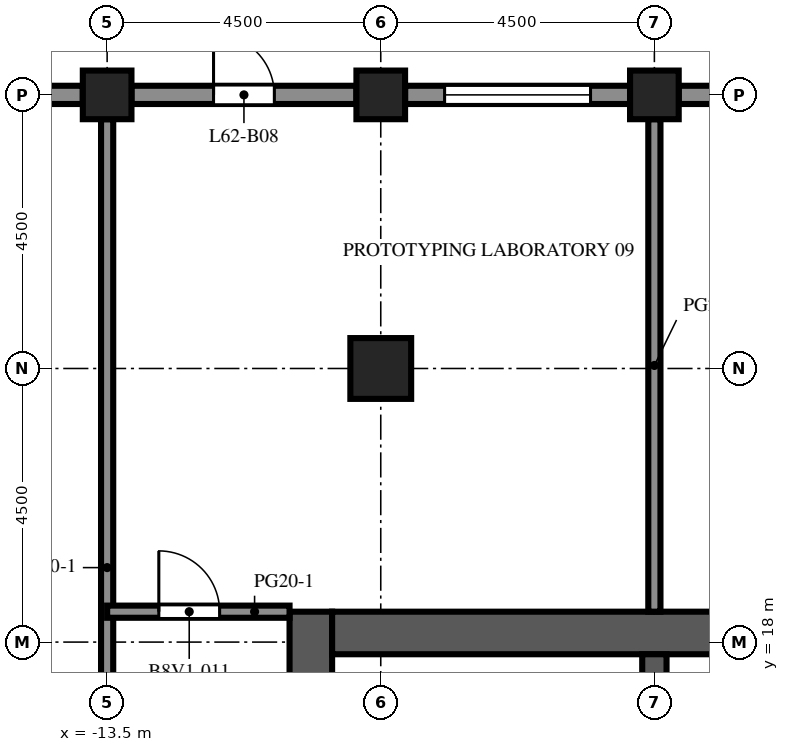
"""IFC4 building model, lengths in metres.
Left out: names, types, materials, properties, quantities, classifications, styles, units other than length and angle.
Written with IfcOpenShell. Run it as: python <this file> out.ifc"""

import sys

from ifc_helpers import new_model, si_unit, direction, frame, frame_2d, origin, origin_2d, place, context, subcontext, project, spatial, rectangle, extrude, element, fill, save


model = new_model("IFC4")
c1 = context("Model", 3, precision=1e-05, world=origin(), true_north=direction((0.0, 1.0)))
c2 = subcontext(c1, "Body", "Model", "MODEL_VIEW")
j1 = project(units=[si_unit("LENGTHUNIT", "METRE"), si_unit("PLANEANGLEUNIT", "RADIAN")], contexts=[c1])
p1 = place(None, origin())
s1 = spatial("IfcSite", under=j1, at=p1, CompositionType="ELEMENT")
p2 = place(p1, origin())
s2 = spatial("IfcBuilding", under=s1, at=p2, CompositionType="ELEMENT")
p3 = place(p2, frame((0.0, 0.0, 274.5)))
s3 = spatial("IfcBuildingStorey", under=s2, at=p3, CompositionType="ELEMENT", Elevation=274.5)
for number, where, z_axis, x_axis in (
    (1, (-13.5, 27.0, 0.0), (0.0, 0.0, 1.0), (1.0, 0.0, 0.0)),
    (2, (-9.0, 27.0, 0.0), (0.0, 0.0, 1.0), (1.0, 0.0, 0.0)),
    (3, (-4.5, 27.0, 0.0), (0.0, 0.0, 1.0), (1.0, 0.0, 0.0)),
):
    element("IfcColumn", number, at=place(p3, frame(where, z_axis=z_axis, x_axis=x_axis)), inside=s3, PredefinedType="COLUMN", context=c2, shape_type="SweptSolid", body=[
        extrude(rectangle(XDim=0.8, YDim=0.8, at=origin_2d()), origin(), (0.0, 0.0, 1.0), 4.1),
    ])
p4 = place(p3, frame((-9.0, 22.5, 0.0), z_axis=(0.0, 0.0, 1.0), x_axis=(1.0, 0.0, 0.0)))
e4 = element("IfcColumn", 4, at=p4, inside=s3, PredefinedType="COLUMN", context=c2, shape_type="SweptSolid", body=[
    extrude(rectangle(XDim=1.0, YDim=1.0, at=origin_2d()), origin(), (0.0, 0.0, 1.0), 4.1),
])
p5 = place(p3, frame((-10.15, -9.0, 0.0), z_axis=(0.0, 0.0, 1.0), x_axis=(0.0, 1.0, 0.0)))
e5 = element("IfcWall", 5, at=p5, inside=s3, PredefinedType="SHEAR", context=c2, shape_type="SweptSolid", body=[
    extrude(rectangle(XDim=27.5, YDim=0.7, at=frame_2d((13.75, 0.0))), origin(), (0.0, 0.0, 1.0), 4.1),
])
p6 = place(p5, frame((12.55, 0.0, 0.0)))
e6 = element("IfcOpeningElement", 6, at=p6, cuts=e5, PredefinedType="OPENING", context=c2, shape_type="SweptSolid", body=[
    extrude(rectangle(XDim=2.4, YDim=2.4, at=frame_2d((1.2, 1.2))), frame((0.0, 0.36, 0.0), z_axis=(0.0, -1.0, 0.0), x_axis=(1.0, 0.0, 0.0)), (0.0, 0.0, 1.0), 0.72),
])
p7 = place(p5, frame((6.825, 0.0, 0.0)))
e7 = element("IfcOpeningElement", 7, at=p7, cuts=e5, PredefinedType="OPENING", context=c2, shape_type="SweptSolid", body=[
    extrude(rectangle(XDim=1.2, YDim=2.1, at=frame_2d((0.6, 1.05))), frame((0.0, 0.36, 0.0), z_axis=(0.0, -1.0, 0.0), x_axis=(1.0, 0.0, 0.0)), (0.0, 0.0, 1.0), 0.72),
])
p8 = place(p5, frame((19.475, 0.0, 0.0)))
e8 = element("IfcOpeningElement", 8, at=p8, cuts=e5, PredefinedType="OPENING", context=c2, shape_type="SweptSolid", body=[
    extrude(rectangle(XDim=1.2, YDim=2.1, at=frame_2d((0.6, 1.05))), frame((0.0, 0.36, 0.0), z_axis=(0.0, -1.0, 0.0), x_axis=(1.0, 0.0, 0.0)), (0.0, 0.0, 1.0), 0.72),
])
p9 = place(p3, frame((-9.8, 18.15, 0.0), z_axis=(0.0, 0.0, 1.0), x_axis=(1.0, 0.0, 0.0)))
e9 = element("IfcWall", 9, at=p9, inside=s3, PredefinedType="SHEAR", context=c2, shape_type="SweptSolid", body=[
    extrude(rectangle(XDim=10.6, YDim=0.7, at=frame_2d((5.3, 0.0))), origin(), (0.0, 0.0, 1.0), 4.1),
])
p10 = place(p3, frame((-4.5, 10.2, 0.0), z_axis=(0.0, 0.0, 1.0), x_axis=(0.0, 1.0, 0.0)))
e10 = element("IfcWall", 10, at=p10, inside=s3, PredefinedType="SHEAR", context=c2, shape_type="SweptSolid", body=[
    extrude(rectangle(XDim=7.6, YDim=0.4, at=frame_2d((3.8, 0.0))), origin(), (0.0, 0.0, 1.0), 4.1),
])
p11 = place(p3, frame((-4.1, 27.0, 0.0), z_axis=(0.0, 0.0, 1.0), x_axis=(1.0, 0.0, 0.0)))
e11 = element("IfcWall", 11, at=p11, inside=s3, PredefinedType="SOLIDWALL", context=c2, shape_type="SweptSolid", body=[
    extrude(rectangle(XDim=3.7, YDim=0.3, at=frame_2d((1.85, 0.0))), origin(), (0.0, 0.0, 1.0), 2.85),
])
p12 = place(p11, frame((0.65, 0.0, 0.8)))
e12 = element("IfcOpeningElement", 12, at=p12, cuts=e11, PredefinedType="OPENING", context=c2, shape_type="SweptSolid", body=[
    extrude(rectangle(XDim=2.4, YDim=1.7, at=frame_2d((1.2, 0.85))), frame((0.0, 0.16, 0.0), z_axis=(0.0, -1.0, 0.0), x_axis=(1.0, 0.0, 0.0)), (0.0, 0.0, 1.0), 0.32),
])
p13 = place(p3, frame((-8.6, 27.0, 0.0), z_axis=(0.0, 0.0, 1.0), x_axis=(1.0, 0.0, 0.0)))
e13 = element("IfcWall", 13, at=p13, inside=s3, PredefinedType="SOLIDWALL", context=c2, shape_type="SweptSolid", body=[
    extrude(rectangle(XDim=3.7, YDim=0.3, at=frame_2d((1.85, 0.0))), origin(), (0.0, 0.0, 1.0), 2.85),
])
p14 = place(p13, frame((0.65, 0.0, 0.8)))
e14 = element("IfcOpeningElement", 14, at=p14, cuts=e13, PredefinedType="OPENING", context=c2, shape_type="SweptSolid", body=[
    extrude(rectangle(XDim=2.4, YDim=1.7, at=frame_2d((1.2, 0.85))), frame((0.0, 0.16, 0.0), z_axis=(0.0, -1.0, 0.0), x_axis=(1.0, 0.0, 0.0)), (0.0, 0.0, 1.0), 0.32),
])
p15 = place(p3, frame((-13.1, 27.0, 0.0), z_axis=(0.0, 0.0, 1.0), x_axis=(1.0, 0.0, 0.0)))
e15 = element("IfcWall", 15, at=p15, inside=s3, PredefinedType="SOLIDWALL", context=c2, shape_type="SweptSolid", body=[
    extrude(rectangle(XDim=3.7, YDim=0.3, at=frame_2d((1.85, 0.0))), origin(), (0.0, 0.0, 1.0), 2.85),
])
p16 = place(p15, frame((1.35, 0.0, 0.0)))
e16 = element("IfcOpeningElement", 16, at=p16, cuts=e15, PredefinedType="OPENING", context=c2, shape_type="SweptSolid", body=[
    extrude(rectangle(XDim=1.0, YDim=2.2, at=frame_2d((0.5, 1.1))), frame((0.0, 0.16, 0.0), z_axis=(0.0, -1.0, 0.0), x_axis=(1.0, 0.0, 0.0)), (0.0, 0.0, 1.0), 0.32),
])
p17 = place(p3, frame((-17.6, 27.0, 0.0), z_axis=(0.0, 0.0, 1.0), x_axis=(1.0, 0.0, 0.0)))
e17 = element("IfcWall", 17, at=p17, inside=s3, PredefinedType="SOLIDWALL", context=c2, shape_type="SweptSolid", body=[
    extrude(rectangle(XDim=3.7, YDim=0.3, at=frame_2d((1.85, 0.0))), origin(), (0.0, 0.0, 1.0), 2.85),
])
p18 = place(p17, frame((0.65, 0.0, 0.8)))
e18 = element("IfcOpeningElement", 18, at=p18, cuts=e17, PredefinedType="OPENING", context=c2, shape_type="SweptSolid", body=[
    extrude(rectangle(XDim=2.4, YDim=1.7, at=frame_2d((1.2, 0.85))), frame((0.0, 0.16, 0.0), z_axis=(0.0, -1.0, 0.0), x_axis=(1.0, 0.0, 0.0)), (0.0, 0.0, 1.0), 0.32),
])
p19 = place(p3, frame((-13.5, 6.25, 0.0), z_axis=(0.0, 0.0, 1.0), x_axis=(0.0, 1.0, 0.0)))
e19 = element("IfcWall", 19, at=p19, inside=s3, PredefinedType="PARTITIONING", context=c2, shape_type="SweptSolid", body=[
    extrude(rectangle(XDim=20.35, YDim=0.2, at=frame_2d((10.175, 0.0))), origin(), (0.0, 0.0, 1.0), 3.65),
])
p20 = place(p19, frame((4.6, 0.0, 0.0)))
e20 = element("IfcOpeningElement", 20, at=p20, cuts=e19, PredefinedType="OPENING", context=c2, shape_type="SweptSolid", body=[
    extrude(rectangle(XDim=1.0, YDim=2.1, at=frame_2d((0.5, 1.05))), frame((0.0, 0.11, 0.0), z_axis=(0.0, -1.0, 0.0), x_axis=(1.0, 0.0, 0.0)), (0.0, 0.0, 1.0), 0.22),
])
p21 = place(p3, frame((-4.5, 18.5, 0.0), z_axis=(0.0, 0.0, 1.0), x_axis=(0.0, 1.0, 0.0)))
e21 = element("IfcWall", 21, at=p21, inside=s3, PredefinedType="PARTITIONING", context=c2, shape_type="SweptSolid", body=[
    extrude(rectangle(XDim=8.1, YDim=0.2, at=frame_2d((4.05, 0.0))), origin(), (0.0, 0.0, 1.0), 3.65),
])
p22 = place(p3, frame((-13.5, 18.5, 0.0), z_axis=(0.0, 0.0, 1.0), x_axis=(1.0, 0.0, 0.0)))
e22 = element("IfcWall", 22, at=p22, inside=s3, PredefinedType="PARTITIONING", context=c2, shape_type="SweptSolid", body=[
    extrude(rectangle(XDim=3.0, YDim=0.2, at=frame_2d((1.5, 0.0))), origin(), (0.0, 0.0, 1.0), 3.65),
])
p23 = place(p22, frame((0.85, 0.0, 0.0)))
e23 = element("IfcOpeningElement", 23, at=p23, cuts=e22, PredefinedType="OPENING", context=c2, shape_type="SweptSolid", body=[
    extrude(rectangle(XDim=1.0, YDim=2.1, at=frame_2d((0.5, 1.05))), frame((0.0, 0.11, 0.0), z_axis=(0.0, -1.0, 0.0), x_axis=(1.0, 0.0, 0.0)), (0.0, 0.0, 1.0), 0.22),
])
p24 = place(p14, origin())
e24 = element("IfcWindow", 24, at=p24, inside=s3, PartitioningType="SINGLE_PANEL", PredefinedType="WINDOW", context=c2, shape_type="SweptSolid", body=[
    extrude(rectangle(XDim=2.4, YDim=1.7, at=frame_2d((1.2, 0.85))), frame((0.0, 0.03, 0.0), z_axis=(0.0, -1.0, 0.0), x_axis=(1.0, 0.0, 0.0)), (0.0, 0.0, 1.0), 0.06),
])
fill(e14, e24)
p25 = place(p16, origin())
e25 = element("IfcDoor", 25, at=p25, inside=s3, OperationType="SINGLE_SWING_LEFT", PredefinedType="DOOR", context=c2, shape_type="SweptSolid", body=[
    extrude(rectangle(XDim=1.0, YDim=2.2, at=frame_2d((0.5, 1.1))), frame((0.0, 0.025, 0.0), z_axis=(0.0, -1.0, 0.0), x_axis=(1.0, 0.0, 0.0)), (0.0, 0.0, 1.0), 0.05),
])
fill(e16, e25)
p26 = place(p23, origin())
e26 = element("IfcDoor", 26, at=p26, inside=s3, OperationType="SINGLE_SWING_LEFT", PredefinedType="DOOR", context=c2, shape_type="SweptSolid", body=[
    extrude(rectangle(XDim=1.0, YDim=2.1, at=frame_2d((0.5, 1.05))), frame((0.0, 0.025, 0.0), z_axis=(0.0, -1.0, 0.0), x_axis=(1.0, 0.0, 0.0)), (0.0, 0.0, 1.0), 0.05),
])
fill(e23, e26)
save(model, sys.argv[1])
